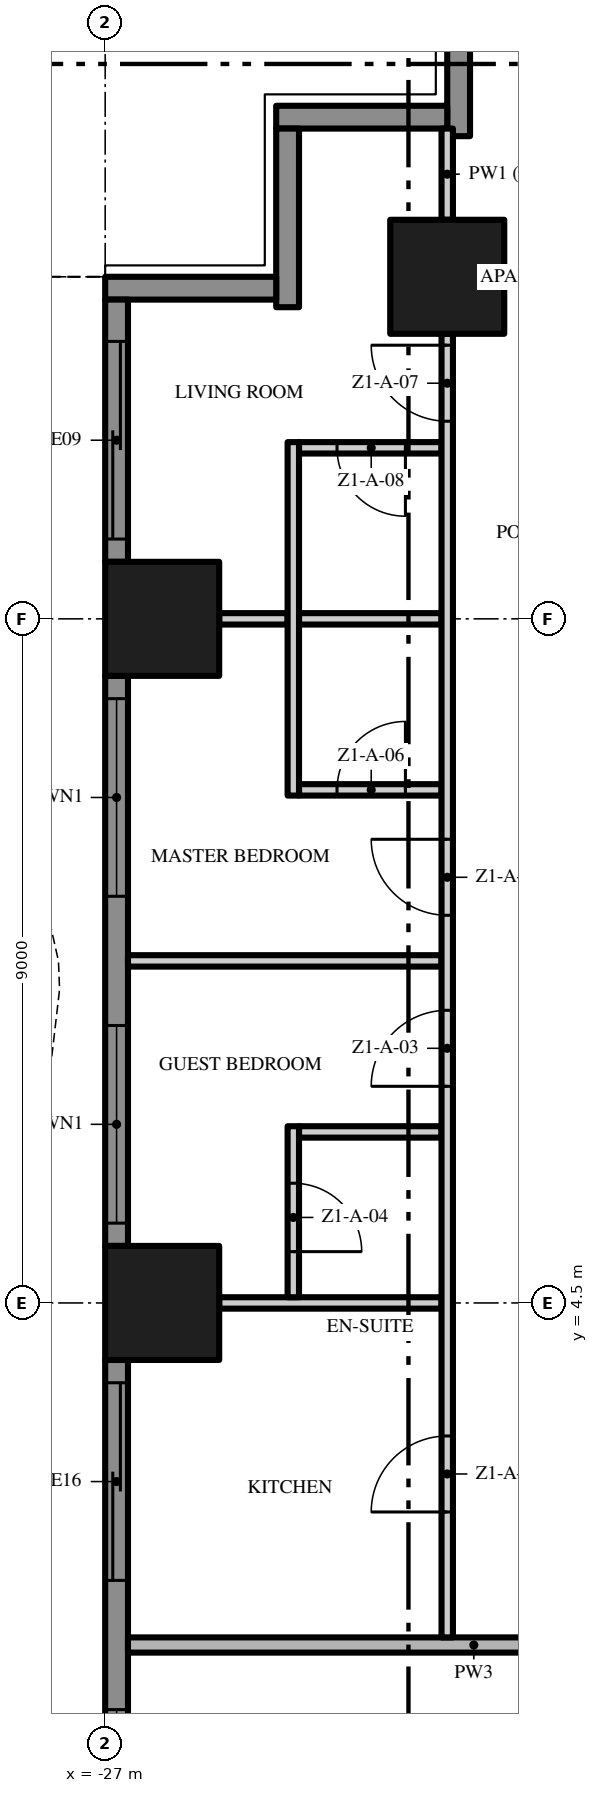
"""IFC4 building model, lengths in metres.
Left out: names, types, materials, properties, quantities, classifications, styles, units other than length and angle.
Written with IfcOpenShell. Run it as: python <this file> out.ifc"""

import sys

from ifc_helpers import new_model, si_unit, direction, frame, frame_2d, origin, origin_2d, place, context, subcontext, project, spatial, polyline, rectangle, outline, extrude, element, fill, save


model = new_model("IFC4")
c1 = context("Model", 3, precision=1e-05, world=origin(), true_north=direction((0.0, 1.0)))
c2 = subcontext(c1, "Body", "Model", "MODEL_VIEW")
j1 = project(units=[si_unit("LENGTHUNIT", "METRE"), si_unit("PLANEANGLEUNIT", "RADIAN")], contexts=[c1])
p1 = place(None, origin())
s1 = spatial("IfcSite", under=j1, at=p1, CompositionType="ELEMENT")
p2 = place(p1, origin())
s2 = spatial("IfcBuilding", under=s1, at=p2, CompositionType="ELEMENT")
p3 = place(p2, frame((0.0, 0.0, 18.8)))
s3 = spatial("IfcBuildingStorey", under=s2, at=p3, CompositionType="ELEMENT", Elevation=18.8)
for number, where, z_axis, x_axis in (
    (1, (-26.25, 13.5, 0.0), (0.0, 0.0, 1.0), (1.0, 0.0, 0.0)),
    (2, (-22.5, 18.0, 0.0), (0.0, 0.0, 1.0), (1.0, 0.0, 0.0)),
    (3, (-26.25, 4.5, 0.0), (0.0, 0.0, 1.0), (1.0, 0.0, 0.0)),
):
    element("IfcColumn", number, at=place(p3, frame(where, z_axis=z_axis, x_axis=x_axis)), inside=s3, PredefinedType="COLUMN", context=c2, shape_type="SweptSolid", body=[
        extrude(rectangle(XDim=1.5, YDim=1.5, at=origin_2d()), origin(), (0.0, 0.0, 1.0), 3.5),
    ])
p4 = place(p3, frame((-22.35, 19.85, 0.0), z_axis=(0.0, 0.0, 1.0), x_axis=(0.0, 1.0, 0.0)))
e4 = element("IfcWall", 4, at=p4, inside=s3, PredefinedType="SOLIDWALL", context=c2, shape_type="SweptSolid", body=[
    extrude(rectangle(XDim=2.35, YDim=0.3, at=frame_2d((1.175, 0.0))), origin(), (0.0, 0.0, 1.0), 3.5),
])
p5 = place(p3, frame((-24.75, 20.1, 0.0), z_axis=(0.0, 0.0, 1.0), x_axis=(1.0, 0.0, 0.0)))
e5 = element("IfcWall", 5, at=p5, inside=s3, PredefinedType="SOLIDWALL", context=c2, shape_type="SweptSolid", body=[
    extrude(rectangle(XDim=2.25, YDim=0.3, at=frame_2d((1.125, 0.0))), origin(), (0.0, 0.0, 1.0), 3.5),
])
p6 = place(p3, frame((-24.6, 17.6, 0.0), z_axis=(0.0, 0.0, 1.0), x_axis=(0.0, 1.0, 0.0)))
e6 = element("IfcWall", 6, at=p6, inside=s3, PredefinedType="SOLIDWALL", context=c2, shape_type="SweptSolid", body=[
    extrude(rectangle(XDim=2.35, YDim=0.3, at=frame_2d((1.175, 0.0))), origin(), (0.0, 0.0, 1.0), 3.5),
])
p7 = place(p3, frame((-27.0, 17.85, 0.0), z_axis=(0.0, 0.0, 1.0), x_axis=(1.0, 0.0, 0.0)))
e7 = element("IfcWall", 7, at=p7, inside=s3, PredefinedType="SOLIDWALL", context=c2, shape_type="SweptSolid", body=[
    extrude(rectangle(XDim=2.25, YDim=0.3, at=frame_2d((1.125, 0.0))), origin(), (0.0, 0.0, 1.0), 3.5),
])
p8 = place(p3, frame((-26.85, 14.25, 0.0), z_axis=(0.0, 0.0, 1.0), x_axis=(0.0, 1.0, 0.0)))
e8 = element("IfcWall", 8, at=p8, inside=s3, PredefinedType="SOLIDWALL", context=c2, shape_type="SweptSolid", body=[
    extrude(rectangle(XDim=3.45, YDim=0.3, at=frame_2d((1.725, 0.0))), origin(), (0.0, 0.0, 1.0), 3.5),
])
p9 = place(p8, frame((0.3, 0.0, 0.0)))
e9 = element("IfcOpeningElement", 9, at=p9, cuts=e8, PredefinedType="OPENING", context=c2, shape_type="SweptSolid", body=[
    extrude(rectangle(XDim=2.6, YDim=2.4, at=frame_2d((1.3, 1.2))), frame((0.0, 0.16, 0.0), z_axis=(0.0, -1.0, 0.0), x_axis=(1.0, 0.0, 0.0)), (0.0, 0.0, 1.0), 0.32),
])
p10 = place(p3, frame((-26.85, 5.25, 0.0), z_axis=(0.0, 0.0, 1.0), x_axis=(0.0, 1.0, 0.0)))
e10 = element("IfcWall", 10, at=p10, inside=s3, PredefinedType="SOLIDWALL", context=c2, shape_type="SweptSolid", body=[
    extrude(rectangle(XDim=7.5, YDim=0.3, at=frame_2d((3.75, 0.0))), origin(), (0.0, 0.0, 1.0), 3.5),
])
p11 = place(p10, frame((4.6, 0.0, 0.45)))
e11 = element("IfcOpeningElement", 11, at=p11, cuts=e10, PredefinedType="OPENING", context=c2, shape_type="SweptSolid", body=[
    extrude(rectangle(XDim=2.6, YDim=2.65, at=frame_2d((1.3, 1.325))), frame((0.0, 0.16, 0.0), z_axis=(0.0, -1.0, 0.0), x_axis=(1.0, 0.0, 0.0)), (0.0, 0.0, 1.0), 0.32),
])
p12 = place(p10, frame((0.3, 0.0, 0.45)))
e12 = element("IfcOpeningElement", 12, at=p12, cuts=e10, PredefinedType="OPENING", context=c2, shape_type="SweptSolid", body=[
    extrude(rectangle(XDim=2.6, YDim=2.65, at=frame_2d((1.3, 1.325))), frame((0.0, 0.16, 0.0), z_axis=(0.0, -1.0, 0.0), x_axis=(1.0, 0.0, 0.0)), (0.0, 0.0, 1.0), 0.32),
])
p13 = place(p3, frame((-26.85, -3.75, 0.0), z_axis=(0.0, 0.0, 1.0), x_axis=(0.0, 1.0, 0.0)))
e13 = element("IfcWall", 13, at=p13, inside=s3, PredefinedType="SOLIDWALL", context=c2, shape_type="SweptSolid", body=[
    extrude(rectangle(XDim=7.5, YDim=0.3, at=frame_2d((3.75, 0.0))), origin(), (0.0, 0.0, 1.0), 3.5),
])
p14 = place(p13, frame((4.6, 0.0, 0.0)))
e14 = element("IfcOpeningElement", 14, at=p14, cuts=e13, PredefinedType="OPENING", context=c2, shape_type="SweptSolid", body=[
    extrude(rectangle(XDim=2.6, YDim=2.4, at=frame_2d((1.3, 1.2))), frame((0.0, 0.16, 0.0), z_axis=(0.0, -1.0, 0.0), x_axis=(1.0, 0.0, 0.0)), (0.0, 0.0, 1.0), 0.32),
])
p15 = place(p13, frame((0.3, 0.0, 0.45)))
e15 = element("IfcOpeningElement", 15, at=p15, cuts=e13, PredefinedType="OPENING", context=c2, shape_type="SweptSolid", body=[
    extrude(rectangle(XDim=2.6, YDim=2.65, at=frame_2d((1.3, 1.325))), frame((0.0, 0.16, 0.0), z_axis=(0.0, -1.0, 0.0), x_axis=(1.0, 0.0, 0.0)), (0.0, 0.0, 1.0), 0.32),
])
p16 = place(p3, origin())
e16 = element("IfcWall", 16, at=p16, inside=s3, PredefinedType="USERDEFINED", context=c2, shape_type="SweptSolid", body=[
    extrude(outline(polyline([(-29.649, 18.0), (-29.985, 16.5), (-30.0, 16.125), (-29.869, 15.0), (-29.345, 13.5), (-28.612, 12.0), (-27.951, 10.5), (-27.615, 9.0), (-27.6, 8.625), (-27.731, 7.5), (-28.255, 6.0), (-28.988, 4.5), (-29.649, 3.0), (-29.985, 1.5), (-30.0, 1.125), (-29.869, 0.0), (-29.345, -1.5), (-28.612, -3.0), (-27.951, -4.5), (-27.615, -6.0), (-27.6, -6.375), (-27.731, -7.5), (-28.255, -9.0), (-28.988, -10.5), (-29.649, -12.0), (-29.985, -13.5), (-30.0, -13.875), (-29.869, -15.0), (-29.345, -16.5), (-28.612, -18.0), (-28.388, -17.89), (-29.114, -16.404), (-29.624, -14.944), (-29.749, -13.865), (-29.736, -13.533), (-29.41, -12.079), (-28.761, -10.605), (-28.024, -9.096), (-27.486, -7.556), (-27.349, -6.385), (-27.366, -5.967), (-27.713, -4.421), (-28.385, -2.895), (-29.114, -1.404), (-29.624, 0.056), (-29.749, 1.135), (-29.736, 1.467), (-29.41, 2.921), (-28.761, 4.395), (-28.024, 5.904), (-27.486, 7.444), (-27.349, 8.615), (-27.366, 9.033), (-27.713, 10.579), (-28.385, 12.105), (-29.114, 13.596), (-29.624, 15.056), (-29.749, 16.135), (-29.736, 16.467), (-29.405, 17.945), (-29.649, 18.0)])), origin(), (0.0, 0.0, 1.0), 0.9),
])
p17 = place(p3, frame((-26.7, 0.0, 0.0), z_axis=(0.0, 0.0, 1.0), x_axis=(1.0, 0.0, 0.0)))
e17 = element("IfcWall", 17, at=p17, inside=s3, PredefinedType="PARTITIONING", context=c2, shape_type="SweptSolid", body=[
    extrude(rectangle(XDim=9.1, YDim=0.2, at=frame_2d((4.55, 0.0))), origin(), (0.0, 0.0, 1.0), 3.5),
])
p18 = place(p3, frame((-25.5, 4.5, 0.0), z_axis=(0.0, 0.0, 1.0), x_axis=(1.0, 0.0, 0.0)))
e18 = element("IfcWall", 18, at=p18, inside=s3, PredefinedType="PARTITIONING", context=c2, shape_type="SweptSolid", body=[
    extrude(rectangle(XDim=2.925, YDim=0.15, at=frame_2d((1.462, 0.0))), origin(), (0.0, 0.0, 1.0), 3.5),
])
p19 = place(p3, frame((-24.45, 6.75, 0.0), z_axis=(0.0, 0.0, 1.0), x_axis=(1.0, 0.0, 0.0)))
e19 = element("IfcWall", 19, at=p19, inside=s3, PredefinedType="PARTITIONING", context=c2, shape_type="SweptSolid", body=[
    extrude(rectangle(XDim=1.875, YDim=0.15, at=frame_2d((0.938, 0.0))), origin(), (0.0, 0.0, 1.0), 3.5),
])
p20 = place(p3, frame((-26.7, 9.0, 0.0), z_axis=(0.0, 0.0, 1.0), x_axis=(1.0, 0.0, 0.0)))
e20 = element("IfcWall", 20, at=p20, inside=s3, PredefinedType="PARTITIONING", context=c2, shape_type="SweptSolid", body=[
    extrude(rectangle(XDim=4.125, YDim=0.15, at=frame_2d((2.062, 0.0))), origin(), (0.0, 0.0, 1.0), 3.5),
])
p21 = place(p3, frame((-24.45, 11.25, 0.0), z_axis=(0.0, 0.0, 1.0), x_axis=(1.0, 0.0, 0.0)))
e21 = element("IfcWall", 21, at=p21, inside=s3, PredefinedType="PARTITIONING", context=c2, shape_type="SweptSolid", body=[
    extrude(rectangle(XDim=1.875, YDim=0.15, at=frame_2d((0.938, 0.0))), origin(), (0.0, 0.0, 1.0), 3.5),
])
p22 = place(p21, frame((0.5, 0.0, 0.0)))
e22 = element("IfcOpeningElement", 22, at=p22, cuts=e21, PredefinedType="OPENING", context=c2, shape_type="SweptSolid", body=[
    extrude(rectangle(XDim=0.9, YDim=2.1, at=frame_2d((0.45, 1.05))), frame((0.0, 0.085, 0.0), z_axis=(0.0, -1.0, 0.0), x_axis=(1.0, 0.0, 0.0)), (0.0, 0.0, 1.0), 0.17),
])
p23 = place(p3, frame((-25.5, 13.5, 0.0), z_axis=(0.0, 0.0, 1.0), x_axis=(1.0, 0.0, 0.0)))
e23 = element("IfcWall", 23, at=p23, inside=s3, PredefinedType="PARTITIONING", context=c2, shape_type="SweptSolid", body=[
    extrude(rectangle(XDim=0.9, YDim=0.15, at=frame_2d((0.45, 0.0))), origin(), (0.0, 0.0, 1.0), 3.5),
])
p24 = place(p3, frame((-24.45, 13.5, 0.0), z_axis=(0.0, 0.0, 1.0), x_axis=(1.0, 0.0, 0.0)))
e24 = element("IfcWall", 24, at=p24, inside=s3, PredefinedType="PARTITIONING", context=c2, shape_type="SweptSolid", body=[
    extrude(rectangle(XDim=1.875, YDim=0.15, at=frame_2d((0.938, 0.0))), origin(), (0.0, 0.0, 1.0), 3.5),
])
p25 = place(p3, frame((-22.575, 15.75, 0.0), z_axis=(0.0, 0.0, 1.0), x_axis=(-1.0, 0.0, 0.0)))
e25 = element("IfcWall", 25, at=p25, inside=s3, PredefinedType="PARTITIONING", context=c2, shape_type="SweptSolid", body=[
    extrude(rectangle(XDim=1.875, YDim=0.15, at=frame_2d((0.938, 0.0))), origin(), (0.0, 0.0, 1.0), 3.5),
])
p26 = place(p25, frame((0.475, 0.0, 0.0)))
e26 = element("IfcOpeningElement", 26, at=p26, cuts=e25, PredefinedType="OPENING", context=c2, shape_type="SweptSolid", body=[
    extrude(rectangle(XDim=0.9, YDim=2.1, at=frame_2d((0.45, 1.05))), frame((0.0, 0.085, 0.0), z_axis=(0.0, -1.0, 0.0), x_axis=(1.0, 0.0, 0.0)), (0.0, 0.0, 1.0), 0.17),
])
p27 = place(p3, frame((-24.525, 6.825, 0.0), z_axis=(0.0, 0.0, 1.0), x_axis=(0.0, -1.0, 0.0)))
e27 = element("IfcWall", 27, at=p27, inside=s3, PredefinedType="PARTITIONING", context=c2, shape_type="SweptSolid", body=[
    extrude(rectangle(XDim=2.25, YDim=0.15, at=frame_2d((1.125, 0.0))), origin(), (0.0, 0.0, 1.0), 3.5),
])
p28 = place(p27, frame((0.75, 0.0, 0.0)))
e28 = element("IfcOpeningElement", 28, at=p28, cuts=e27, PredefinedType="OPENING", context=c2, shape_type="SweptSolid", body=[
    extrude(rectangle(XDim=0.9, YDim=2.1, at=frame_2d((0.45, 1.05))), frame((0.0, 0.085, 0.0), z_axis=(0.0, -1.0, 0.0), x_axis=(1.0, 0.0, 0.0)), (0.0, 0.0, 1.0), 0.17),
])
p29 = place(p3, frame((-24.525, 11.175, 0.0), z_axis=(0.0, 0.0, 1.0), x_axis=(0.0, 1.0, 0.0)))
e29 = element("IfcWall", 29, at=p29, inside=s3, PredefinedType="PARTITIONING", context=c2, shape_type="SweptSolid", body=[
    extrude(rectangle(XDim=4.65, YDim=0.15, at=frame_2d((2.325, 0.0))), origin(), (0.0, 0.0, 1.0), 3.5),
])
p30 = place(p3, frame((-22.5, 0.1, 0.0), z_axis=(0.0, 0.0, 1.0), x_axis=(0.0, 1.0, 0.0)))
e30 = element("IfcWall", 30, at=p30, inside=s3, PredefinedType="PARTITIONING", context=c2, shape_type="SweptSolid", body=[
    extrude(rectangle(XDim=17.15, YDim=0.15, at=frame_2d((8.575, 0.0))), origin(), (0.0, 0.0, 1.0), 3.5),
])
p31 = place(p30, frame((1.65, 0.0, 0.0)))
e31 = element("IfcOpeningElement", 31, at=p31, cuts=e30, PredefinedType="OPENING", context=c2, shape_type="SweptSolid", body=[
    extrude(rectangle(XDim=1.0, YDim=2.4, at=frame_2d((0.5, 1.2))), frame((0.0, 0.085, 0.0), z_axis=(0.0, -1.0, 0.0), x_axis=(1.0, 0.0, 0.0)), (0.0, 0.0, 1.0), 0.17),
])
p32 = place(p30, frame((7.25, 0.0, 0.0)))
e32 = element("IfcOpeningElement", 32, at=p32, cuts=e30, PredefinedType="OPENING", context=c2, shape_type="SweptSolid", body=[
    extrude(rectangle(XDim=1.0, YDim=2.4, at=frame_2d((0.5, 1.2))), frame((0.0, 0.085, 0.0), z_axis=(0.0, -1.0, 0.0), x_axis=(1.0, 0.0, 0.0)), (0.0, 0.0, 1.0), 0.17),
])
p33 = place(p30, frame((9.5, 0.0, 0.0)))
e33 = element("IfcOpeningElement", 33, at=p33, cuts=e30, PredefinedType="OPENING", context=c2, shape_type="SweptSolid", body=[
    extrude(rectangle(XDim=1.0, YDim=2.4, at=frame_2d((0.5, 1.2))), frame((0.0, 0.085, 0.0), z_axis=(0.0, -1.0, 0.0), x_axis=(1.0, 0.0, 0.0)), (0.0, 0.0, 1.0), 0.17),
])
p34 = place(p30, frame((16.0, 0.0, 0.0)))
e34 = element("IfcOpeningElement", 34, at=p34, cuts=e30, PredefinedType="OPENING", context=c2, shape_type="SweptSolid", body=[
    extrude(rectangle(XDim=1.0, YDim=2.4, at=frame_2d((0.5, 1.2))), frame((0.0, 0.085, 0.0), z_axis=(0.0, -1.0, 0.0), x_axis=(1.0, 0.0, 0.0)), (0.0, 0.0, 1.0), 0.17),
])
p35 = place(p3, frame((-22.5, 18.75, 0.0), z_axis=(0.0, 0.0, 1.0), x_axis=(0.0, 1.0, 0.0)))
e35 = element("IfcWall", 35, at=p35, inside=s3, PredefinedType="PARTITIONING", context=c2, shape_type="SweptSolid", body=[
    extrude(rectangle(XDim=1.2, YDim=0.15, at=frame_2d((0.6, 0.0))), origin(), (0.0, 0.0, 1.0), 3.5),
])
p36 = place(p9, origin())
e36 = element("IfcDoor", 36, at=p36, inside=s3, OperationType="SINGLE_SWING_LEFT", PredefinedType="DOOR", context=c2, shape_type="SweptSolid", body=[
    extrude(rectangle(XDim=2.6, YDim=2.4, at=frame_2d((1.3, 1.2))), frame((0.0, 0.025, 0.0), z_axis=(0.0, -1.0, 0.0), x_axis=(1.0, 0.0, 0.0)), (0.0, 0.0, 1.0), 0.05),
])
fill(e9, e36)
p37 = place(p11, origin())
e37 = element("IfcWindow", 37, at=p37, inside=s3, PartitioningType="SINGLE_PANEL", PredefinedType="WINDOW", context=c2, shape_type="SweptSolid", body=[
    extrude(rectangle(XDim=2.6, YDim=2.65, at=frame_2d((1.3, 1.325))), frame((0.0, 0.03, 0.0), z_axis=(0.0, -1.0, 0.0), x_axis=(1.0, 0.0, 0.0)), (0.0, 0.0, 1.0), 0.06),
])
fill(e11, e37)
p38 = place(p12, origin())
e38 = element("IfcWindow", 38, at=p38, inside=s3, PartitioningType="SINGLE_PANEL", PredefinedType="WINDOW", context=c2, shape_type="SweptSolid", body=[
    extrude(rectangle(XDim=2.6, YDim=2.65, at=frame_2d((1.3, 1.325))), frame((0.0, 0.03, 0.0), z_axis=(0.0, -1.0, 0.0), x_axis=(1.0, 0.0, 0.0)), (0.0, 0.0, 1.0), 0.06),
])
fill(e12, e38)
p39 = place(p14, origin())
e39 = element("IfcDoor", 39, at=p39, inside=s3, OperationType="SINGLE_SWING_LEFT", PredefinedType="DOOR", context=c2, shape_type="SweptSolid", body=[
    extrude(rectangle(XDim=2.6, YDim=2.4, at=frame_2d((1.3, 1.2))), frame((0.0, 0.025, 0.0), z_axis=(0.0, -1.0, 0.0), x_axis=(1.0, 0.0, 0.0)), (0.0, 0.0, 1.0), 0.05),
])
fill(e14, e39)
p40 = place(p15, origin())
e40 = element("IfcWindow", 40, at=p40, inside=s3, PartitioningType="SINGLE_PANEL", PredefinedType="WINDOW", context=c2, shape_type="SweptSolid", body=[
    extrude(rectangle(XDim=2.6, YDim=2.65, at=frame_2d((1.3, 1.325))), frame((0.0, 0.03, 0.0), z_axis=(0.0, -1.0, 0.0), x_axis=(1.0, 0.0, 0.0)), (0.0, 0.0, 1.0), 0.06),
])
fill(e15, e40)
p41 = place(p31, origin())
e41 = element("IfcDoor", 41, at=p41, inside=s3, OperationType="SINGLE_SWING_LEFT", PredefinedType="DOOR", context=c2, shape_type="SweptSolid", body=[
    extrude(rectangle(XDim=1.0, YDim=2.4, at=frame_2d((0.5, 1.2))), frame((0.0, 0.025, 0.0), z_axis=(0.0, -1.0, 0.0), x_axis=(1.0, 0.0, 0.0)), (0.0, 0.0, 1.0), 0.05),
])
fill(e31, e41)
p42 = place(p32, origin())
e42 = element("IfcDoor", 42, at=p42, inside=s3, OperationType="SINGLE_SWING_LEFT", PredefinedType="DOOR", context=c2, shape_type="SweptSolid", body=[
    extrude(rectangle(XDim=1.0, YDim=2.4, at=frame_2d((0.5, 1.2))), frame((0.0, 0.025, 0.0), z_axis=(0.0, -1.0, 0.0), x_axis=(1.0, 0.0, 0.0)), (0.0, 0.0, 1.0), 0.05),
])
fill(e32, e42)
p43 = place(p28, origin())
e43 = element("IfcDoor", 43, at=p43, inside=s3, OperationType="SINGLE_SWING_RIGHT", PredefinedType="DOOR", context=c2, shape_type="SweptSolid", body=[
    extrude(rectangle(XDim=0.9, YDim=2.1, at=frame_2d((0.45, 1.05))), frame((0.0, 0.025, 0.0), z_axis=(0.0, -1.0, 0.0), x_axis=(1.0, 0.0, 0.0)), (0.0, 0.0, 1.0), 0.05),
])
fill(e28, e43)
p44 = place(p33, origin())
e44 = element("IfcDoor", 44, at=p44, inside=s3, OperationType="SINGLE_SWING_RIGHT", PredefinedType="DOOR", context=c2, shape_type="SweptSolid", body=[
    extrude(rectangle(XDim=1.0, YDim=2.4, at=frame_2d((0.5, 1.2))), frame((0.0, 0.025, 0.0), z_axis=(0.0, -1.0, 0.0), x_axis=(1.0, 0.0, 0.0)), (0.0, 0.0, 1.0), 0.05),
])
fill(e33, e44)
p45 = place(p22, origin())
e45 = element("IfcDoor", 45, at=p45, inside=s3, OperationType="SINGLE_SWING_RIGHT", PredefinedType="DOOR", context=c2, shape_type="SweptSolid", body=[
    extrude(rectangle(XDim=0.9, YDim=2.1, at=frame_2d((0.45, 1.05))), frame((0.0, 0.025, 0.0), z_axis=(0.0, -1.0, 0.0), x_axis=(1.0, 0.0, 0.0)), (0.0, 0.0, 1.0), 0.05),
])
fill(e22, e45)
p46 = place(p34, origin())
e46 = element("IfcDoor", 46, at=p46, inside=s3, OperationType="SINGLE_SWING_RIGHT", PredefinedType="DOOR", context=c2, shape_type="SweptSolid", body=[
    extrude(rectangle(XDim=1.0, YDim=2.4, at=frame_2d((0.5, 1.2))), frame((0.0, 0.025, 0.0), z_axis=(0.0, -1.0, 0.0), x_axis=(1.0, 0.0, 0.0)), (0.0, 0.0, 1.0), 0.05),
])
fill(e34, e46)
p47 = place(p26, origin())
e47 = element("IfcDoor", 47, at=p47, inside=s3, OperationType="SINGLE_SWING_LEFT", PredefinedType="DOOR", context=c2, shape_type="SweptSolid", body=[
    extrude(rectangle(XDim=0.9, YDim=2.1, at=frame_2d((0.45, 1.05))), frame((0.0, 0.025, 0.0), z_axis=(0.0, -1.0, 0.0), x_axis=(1.0, 0.0, 0.0)), (0.0, 0.0, 1.0), 0.05),
])
fill(e26, e47)
save(model, sys.argv[1])
